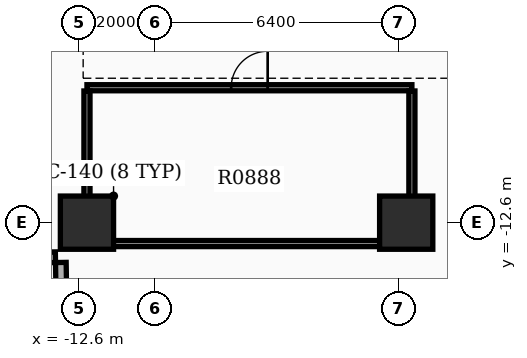
"""IFC4 building model, lengths in metres.
Left out: names, types, materials, properties, quantities, classifications, styles, units other than length and angle.
Written with IfcOpenShell. Run it as: python <this file> out.ifc"""

import sys

from ifc_helpers import new_model, si_unit, direction, frame, frame_2d, origin, origin_2d, place, context, subcontext, project, spatial, rectangle, extrude, element, fill, save


model = new_model("IFC4")
c1 = context("Model", 3, precision=1e-05, world=origin(), true_north=direction((0.0, 1.0)))
c2 = subcontext(c1, "Body", "Model", "MODEL_VIEW")
j1 = project(units=[si_unit("LENGTHUNIT", "METRE"), si_unit("PLANEANGLEUNIT", "RADIAN")], contexts=[c1])
p1 = place(None, origin())
s1 = spatial("IfcSite", under=j1, at=p1, CompositionType="ELEMENT")
p2 = place(p1, origin())
s2 = spatial("IfcBuilding", under=s1, at=p2, CompositionType="ELEMENT")
p3 = place(p2, frame((0.0, 0.0, 60.0)))
s3 = spatial("IfcBuildingStorey", under=s2, at=p3, CompositionType="ELEMENT", Elevation=60.0)
for number, where, z_axis, x_axis in (
    (1, (-12.4, -12.6, 0.0), (0.0, 0.0, 1.0), (1.0, 0.0, 0.0)),
    (2, (-4.0, -12.6, 0.0), (0.0, 0.0, 1.0), (1.0, 0.0, 0.0)),
):
    element("IfcColumn", number, at=place(p3, frame(where, z_axis=z_axis, x_axis=x_axis)), inside=s3, PredefinedType="COLUMN", context=c2, shape_type="SweptSolid", body=[
        extrude(rectangle(XDim=1.4, YDim=1.4, at=origin_2d()), origin(), (0.0, 0.0, 1.0), 3.9),
    ])
p4 = place(p3, frame((-14.449, -13.529, 0.0), z_axis=(0.0, 0.0, 1.0), x_axis=(0.999878147354, 0.015610587569, 0.0)))
e3 = element("IfcWall", 3, at=p4, inside=s3, PredefinedType="STANDARD", context=c2, shape_type="SweptSolid", body=[
    extrude(rectangle(XDim=1.22, YDim=0.28, at=frame_2d((0.61, 0.0))), origin(), (0.0, 0.0, 1.0), 2.91),
])
p5 = place(p3, frame((-13.087, -13.647, 0.0), z_axis=(0.0, 0.0, 1.0), x_axis=(0.015785793208, -0.999875396603, 0.0)))
e4 = element("IfcWall", 4, at=p5, inside=s3, PredefinedType="STANDARD", context=c2, shape_type="SweptSolid", body=[
    extrude(rectangle(XDim=1.5, YDim=0.28, at=frame_2d((0.75, 0.0))), origin(), (0.0, 0.0, 1.0), 2.91),
])
p6 = place(p3, frame((-12.4, -13.15, 0.0), z_axis=(0.0, 0.0, 1.0), x_axis=(1.0, 0.0, 0.0)))
e5 = element("IfcWall", 5, at=p6, inside=s3, PredefinedType="PARTITIONING", context=c2, shape_type="SweptSolid", body=[
    extrude(rectangle(XDim=8.55, YDim=0.16, at=frame_2d((4.275, 0.0))), origin(), (0.0, 0.0, 1.0), 2.9),
])
p7 = place(p3, frame((-12.4, -9.05, 0.0), z_axis=(0.0, 0.0, 1.0), x_axis=(1.0, 0.0, 0.0)))
e6 = element("IfcWall", 6, at=p7, inside=s3, PredefinedType="PARTITIONING", context=c2, shape_type="SweptSolid", body=[
    extrude(rectangle(XDim=8.55, YDim=0.16, at=frame_2d((4.275, 0.0))), origin(), (0.0, 0.0, 1.0), 2.9),
])
p8 = place(p7, frame((3.795, 0.0, 0.0)))
e7 = element("IfcOpeningElement", 7, at=p8, cuts=e6, PredefinedType="OPENING", context=c2, shape_type="SweptSolid", body=[
    extrude(rectangle(XDim=0.96, YDim=2.15, at=frame_2d((0.48, 1.075))), frame((0.0, 0.09, 0.0), z_axis=(0.0, -1.0, 0.0), x_axis=(1.0, 0.0, 0.0)), (0.0, 0.0, 1.0), 0.18),
])
for number, where, z_axis, x_axis in (
    (8, (-12.4, -13.065, 0.0), (0.0, 0.0, 1.0), (0.0, 1.0, 0.0)),
    (9, (-3.85, -13.065, 0.0), (0.0, 0.0, 1.0), (0.0, 1.0, 0.0)),
):
    element("IfcWall", number, at=place(p3, frame(where, z_axis=z_axis, x_axis=x_axis)), inside=s3, PredefinedType="PARTITIONING", context=c2, shape_type="SweptSolid", body=[
        extrude(rectangle(XDim=3.93, YDim=0.16, at=frame_2d((1.965, 0.0))), origin(), (0.0, 0.0, 1.0), 2.9),
    ])
p9 = place(p8, origin())
e10 = element("IfcDoor", 10, at=p9, inside=s3, OperationType="SINGLE_SWING_RIGHT", PredefinedType="DOOR", context=c2, shape_type="SweptSolid", body=[
    extrude(rectangle(XDim=0.96, YDim=2.15, at=frame_2d((0.48, 1.075))), frame((0.0, 0.025, 0.0), z_axis=(0.0, -1.0, 0.0), x_axis=(1.0, 0.0, 0.0)), (0.0, 0.0, 1.0), 0.05),
])
fill(e7, e10)
save(model, sys.argv[1])
